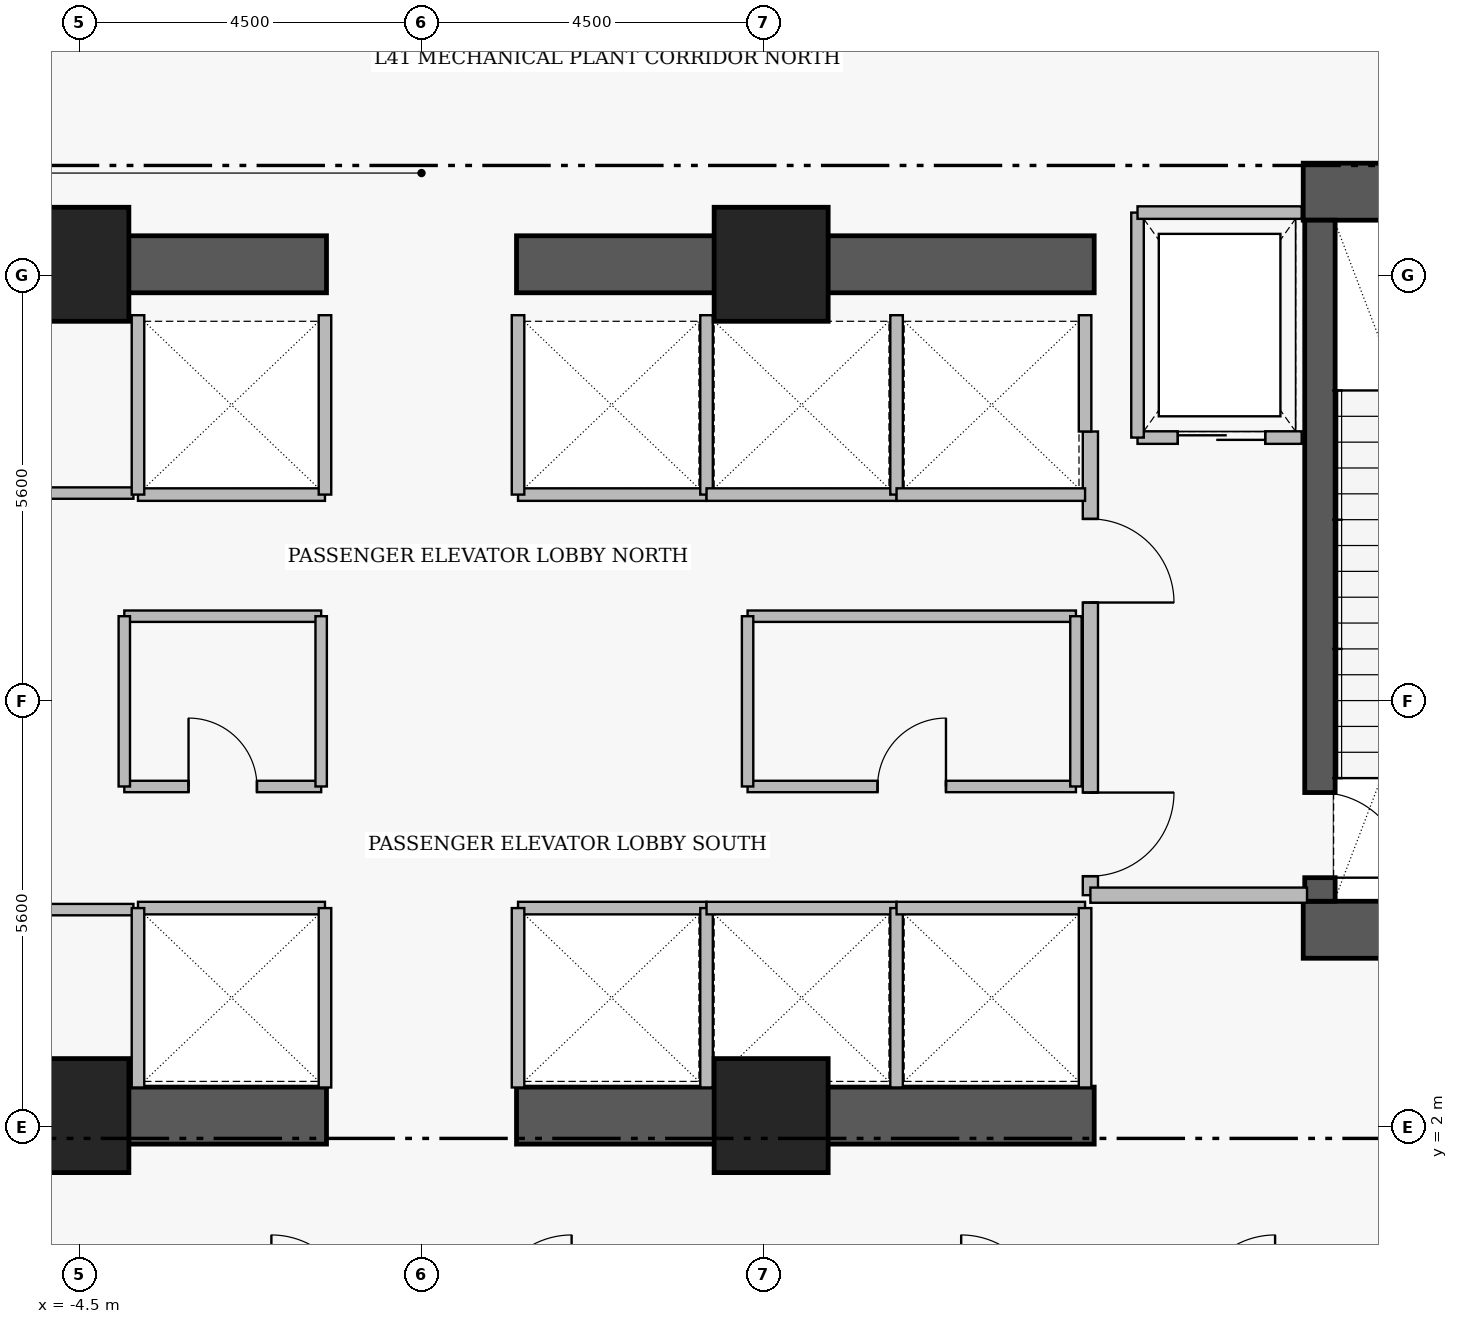
"""IFC4 building model, lengths in metres.
Left out: names, types, materials, properties, quantities, classifications, styles, units other than length and angle.
Written with IfcOpenShell. Run it as: python <this file> out.ifc"""

import sys

from ifc_helpers import new_model, si_unit, direction, frame, frame_2d, origin, origin_2d, place, context, subcontext, project, spatial, rectangle, extrude, element, fill, save


model = new_model("IFC4")
c1 = context("Model", 3, precision=1e-05, world=origin(), true_north=direction((0.0, 1.0)))
c2 = subcontext(c1, "Body", "Model", "MODEL_VIEW")
j1 = project(units=[si_unit("LENGTHUNIT", "METRE"), si_unit("PLANEANGLEUNIT", "RADIAN")], contexts=[c1])
p1 = place(None, origin())
s1 = spatial("IfcSite", under=j1, at=p1, CompositionType="ELEMENT")
p2 = place(p1, origin())
s2 = spatial("IfcBuilding", under=s1, at=p2, CompositionType="ELEMENT")
p3 = place(p2, frame((0.0, 0.0, 162.2)))
s3 = spatial("IfcBuildingStorey", under=s2, at=p3, CompositionType="ELEMENT", Elevation=162.2)
for number, where, z_axis, x_axis in (
    (1, (11.6, 14.305, 0.0), (0.0, 0.0, 1.0), (1.0, 0.0, 0.0)),
    (2, (11.6, 4.595, 0.0), (0.0, 0.0, 1.0), (1.0, 0.0, 0.0)),
):
    element("IfcWall", number, at=place(p3, frame(where, z_axis=z_axis, x_axis=x_axis)), inside=s3, PredefinedType="SHEAR", context=c2, shape_type="SweptSolid", body=[
        extrude(rectangle(XDim=4.56, YDim=0.75, at=frame_2d((2.28, 0.0))), origin(), (0.0, 0.0, 1.0), 5.81),
    ])
for number, where, z_axis, x_axis in (
    (3, (-8.85, 2.15, 0.0), (0.0, 0.0, 1.0), (1.0, 0.0, 0.0)),
    (4, (1.25, 2.15, 0.0), (0.0, 0.0, 1.0), (1.0, 0.0, 0.0)),
    (5, (-8.85, 13.35, 0.0), (0.0, 0.0, 1.0), (1.0, 0.0, 0.0)),
    (6, (1.25, 13.35, 0.0), (0.0, 0.0, 1.0), (1.0, 0.0, 0.0)),
):
    element("IfcWall", number, at=place(p3, frame(where, z_axis=z_axis, x_axis=x_axis)), inside=s3, PredefinedType="SHEAR", context=c2, shape_type="SweptSolid", body=[
        extrude(rectangle(XDim=7.6, YDim=0.75, at=frame_2d((3.8, 0.0))), origin(), (0.0, 0.0, 1.0), 5.74),
    ])
p4 = place(p3, frame((11.82, 13.93, 0.0), z_axis=(0.0, 0.0, 1.0), x_axis=(0.0, -1.0, 0.0)))
e7 = element("IfcWall", 7, at=p4, inside=s3, PredefinedType="SHEAR", context=c2, shape_type="SweptSolid", body=[
    extrude(rectangle(XDim=8.96, YDim=0.4, at=frame_2d((4.48, 0.0))), origin(), (0.0, 0.0, 1.0), 5.81),
])
p5 = place(p4, frame((7.53, 0.0, 0.0)))
e8 = element("IfcOpeningElement", 8, at=p5, cuts=e7, PredefinedType="OPENING", context=c2, shape_type="SweptSolid", body=[
    extrude(rectangle(XDim=1.12, YDim=2.22, at=frame_2d((0.56, 1.11))), frame((0.0, 0.21, 0.0), z_axis=(0.0, -1.0, 0.0), x_axis=(1.0, 0.0, 0.0)), (0.0, 0.0, 1.0), 0.42),
])
for number, where, z_axis, x_axis in (
    (9, (-4.6, 13.35, 0.0), (0.0, 0.0, 1.0), (1.0, 0.0, 0.0)),
    (10, (4.6, 13.35, 0.0), (0.0, 0.0, 1.0), (1.0, 0.0, 0.0)),
    (11, (-4.6, 2.15, 0.0), (0.0, 0.0, 1.0), (1.0, 0.0, 0.0)),
    (12, (4.6, 2.15, 0.0), (0.0, 0.0, 1.0), (1.0, 0.0, 0.0)),
):
    element("IfcColumn", number, at=place(p3, frame(where, z_axis=z_axis, x_axis=x_axis)), inside=s3, PredefinedType="COLUMN", context=c2, shape_type="SweptSolid", body=[
        extrude(rectangle(XDim=1.5, YDim=1.5, at=origin_2d()), origin(), (0.0, 0.0, 1.0), 6.0),
    ])
p6 = place(p3, frame((8.8, 11.15, 0.0), z_axis=(0.0, 0.0, 1.0), x_axis=(0.0, -1.0, 0.0)))
e13 = element("IfcWall", 13, at=p6, inside=s3, PredefinedType="PARTITIONING", context=c2, shape_type="SweptSolid", body=[
    extrude(rectangle(XDim=6.1, YDim=0.2, at=frame_2d((3.05, 0.0))), origin(), (0.0, 0.0, 1.0), 5.74),
])
p7 = place(p6, frame((1.15, 0.0, 0.0)))
e14 = element("IfcOpeningElement", 14, at=p7, cuts=e13, PredefinedType="OPENING", context=c2, shape_type="SweptSolid", body=[
    extrude(rectangle(XDim=1.1, YDim=2.2, at=frame_2d((0.55, 1.1))), frame((0.0, 0.11, 0.0), z_axis=(0.0, -1.0, 0.0), x_axis=(1.0, 0.0, 0.0)), (0.0, 0.0, 1.0), 0.22),
])
p8 = place(p6, frame((4.75, 0.0, 0.0)))
e15 = element("IfcOpeningElement", 15, at=p8, cuts=e13, PredefinedType="OPENING", context=c2, shape_type="SweptSolid", body=[
    extrude(rectangle(XDim=1.1, YDim=2.2, at=frame_2d((0.55, 1.1))), frame((0.0, 0.11, 0.0), z_axis=(0.0, -1.0, 0.0), x_axis=(1.0, 0.0, 0.0)), (0.0, 0.0, 1.0), 0.22),
])
p9 = place(p3, frame((9.42, 11.07, 0.0), z_axis=(0.0, 0.0, 1.0), x_axis=(1.0, 0.0, 0.0)))
e16 = element("IfcWall", 16, at=p9, inside=s3, PredefinedType="PARTITIONING", context=c2, shape_type="SweptSolid", body=[
    extrude(rectangle(XDim=2.16, YDim=0.165, at=frame_2d((1.08, 0.0))), origin(), (0.0, 0.0, 1.0), 5.74),
])
p10 = place(p9, frame((0.53, 0.0, 0.0)))
e17 = element("IfcOpeningElement", 17, at=p10, cuts=e16, PredefinedType="OPENING", context=c2, shape_type="SweptSolid", body=[
    extrude(rectangle(XDim=1.15, YDim=2.25, at=frame_2d((0.575, 1.125))), frame((0.0, 0.093, 0.0), z_axis=(0.0, -1.0, 0.0), x_axis=(1.0, 0.0, 0.0)), (0.0, 0.0, 1.0), 0.185),
])
p11 = place(p3, frame((-8.71, 4.86, 0.0), z_axis=(0.0, 0.0, 1.0), x_axis=(1.0, 0.0, 0.0)))
e18 = element("IfcWall", 18, at=p11, inside=s3, PredefinedType="PARTITIONING", context=c2, shape_type="SweptSolid", body=[
    extrude(rectangle(XDim=4.92, YDim=0.15, at=frame_2d((2.46, 0.0))), origin(), (0.0, 0.0, 1.0), 5.74),
])
p12 = place(p11, frame((2.01, 0.0, 0.0)))
e19 = element("IfcOpeningElement", 19, at=p12, cuts=e18, PredefinedType="OPENING", context=c2, shape_type="SweptSolid", body=[
    extrude(rectangle(XDim=0.9, YDim=2.15, at=frame_2d((0.45, 1.075))), frame((0.0, 0.085, 0.0), z_axis=(0.0, -1.0, 0.0), x_axis=(1.0, 0.0, 0.0)), (0.0, 0.0, 1.0), 0.17),
])
p13 = place(p3, frame((-8.31, 10.34, 0.0), z_axis=(0.0, 0.0, 1.0), x_axis=(1.0, 0.0, 0.0)))
e20 = element("IfcWall", 20, at=p13, inside=s3, PredefinedType="PARTITIONING", context=c2, shape_type="SweptSolid", body=[
    extrude(rectangle(XDim=4.52, YDim=0.15, at=frame_2d((2.26, 0.0))), origin(), (0.0, 0.0, 1.0), 5.74),
])
p14 = place(p13, frame((1.81, 0.0, 0.0)))
e21 = element("IfcOpeningElement", 21, at=p14, cuts=e20, PredefinedType="OPENING", context=c2, shape_type="SweptSolid", body=[
    extrude(rectangle(XDim=0.9, YDim=2.15, at=frame_2d((0.45, 1.075))), frame((0.0, 0.085, 0.0), z_axis=(0.0, -1.0, 0.0), x_axis=(1.0, 0.0, 0.0)), (0.0, 0.0, 1.0), 0.17),
])
p15 = place(p3, frame((-3.91, 6.48, 0.0), z_axis=(0.0, 0.0, 1.0), x_axis=(1.0, 0.0, 0.0)))
e22 = element("IfcWall", 22, at=p15, inside=s3, PredefinedType="PARTITIONING", context=c2, shape_type="SweptSolid", body=[
    extrude(rectangle(XDim=2.59, YDim=0.15, at=frame_2d((1.295, 0.0))), origin(), (0.0, 0.0, 1.0), 5.74),
])
p16 = place(p15, frame((0.845, 0.0, 0.0)))
e23 = element("IfcOpeningElement", 23, at=p16, cuts=e22, PredefinedType="OPENING", context=c2, shape_type="SweptSolid", body=[
    extrude(rectangle(XDim=0.9, YDim=2.15, at=frame_2d((0.45, 1.075))), frame((0.0, 0.085, 0.0), z_axis=(0.0, -1.0, 0.0), x_axis=(1.0, 0.0, 0.0)), (0.0, 0.0, 1.0), 0.17),
])
p17 = place(p3, frame((4.29, 6.48, 0.0), z_axis=(0.0, 0.0, 1.0), x_axis=(1.0, 0.0, 0.0)))
e24 = element("IfcWall", 24, at=p17, inside=s3, PredefinedType="PARTITIONING", context=c2, shape_type="SweptSolid", body=[
    extrude(rectangle(XDim=4.32, YDim=0.15, at=frame_2d((2.16, 0.0))), origin(), (0.0, 0.0, 1.0), 5.74),
])
p18 = place(p17, frame((1.71, 0.0, 0.0)))
e25 = element("IfcOpeningElement", 25, at=p18, cuts=e24, PredefinedType="OPENING", context=c2, shape_type="SweptSolid", body=[
    extrude(rectangle(XDim=0.9, YDim=2.15, at=frame_2d((0.45, 1.075))), frame((0.0, 0.085, 0.0), z_axis=(0.0, -1.0, 0.0), x_axis=(1.0, 0.0, 0.0)), (0.0, 0.0, 1.0), 0.17),
])
p19 = place(p3, frame((8.8, 5.05, 0.0), z_axis=(0.0, 0.0, 1.0), x_axis=(1.0, 0.0, 0.0)))
e26 = element("IfcWall", 26, at=p19, inside=s3, PredefinedType="PARTITIONING", context=c2, shape_type="SweptSolid", body=[
    extrude(rectangle(XDim=2.85, YDim=0.2, at=frame_2d((1.425, 0.0))), origin(), (0.0, 0.0, 1.0), 5.74),
])
p20 = place(p3, frame((9.42, 11.07, 0.0), z_axis=(0.0, 0.0, 1.0), x_axis=(0.0, 1.0, 0.0)))
e27 = element("IfcWall", 27, at=p20, inside=s3, PredefinedType="PARTITIONING", context=c2, shape_type="SweptSolid", body=[
    extrude(rectangle(XDim=2.96, YDim=0.165, at=frame_2d((1.48, 0.0))), origin(), (0.0, 0.0, 1.0), 5.74),
])
p21 = place(p3, frame((9.42, 14.03, 0.0), z_axis=(0.0, 0.0, 1.0), x_axis=(1.0, 0.0, 0.0)))
e28 = element("IfcWall", 28, at=p21, inside=s3, PredefinedType="PARTITIONING", context=c2, shape_type="SweptSolid", body=[
    extrude(rectangle(XDim=2.16, YDim=0.165, at=frame_2d((1.08, 0.0))), origin(), (0.0, 0.0, 1.0), 5.74),
])
p22 = place(p3, frame((-3.73, 4.88, 0.0), z_axis=(0.0, 0.0, 1.0), x_axis=(1.0, 0.0, 0.0)))
e29 = element("IfcWall", 29, at=p22, inside=s3, PredefinedType="PARTITIONING", context=c2, shape_type="SweptSolid", body=[
    extrude(rectangle(XDim=2.46, YDim=0.165, at=frame_2d((1.23, 0.0))), origin(), (0.0, 0.0, 1.0), 5.74),
])
for number, where, z_axis, x_axis in (
    (30, (-3.73, 2.52, 0.0), (0.0, 0.0, 1.0), (0.0, 1.0, 0.0)),
    (31, (-1.27, 2.52, 0.0), (0.0, 0.0, 1.0), (0.0, 1.0, 0.0)),
):
    element("IfcWall", number, at=place(p3, frame(where, z_axis=z_axis, x_axis=x_axis)), inside=s3, PredefinedType="PARTITIONING", context=c2, shape_type="SweptSolid", body=[
        extrude(rectangle(XDim=2.36, YDim=0.165, at=frame_2d((1.18, 0.0))), origin(), (0.0, 0.0, 1.0), 5.74),
    ])
p23 = place(p3, frame((1.27, 4.88, 0.0), z_axis=(0.0, 0.0, 1.0), x_axis=(1.0, 0.0, 0.0)))
e32 = element("IfcWall", 32, at=p23, inside=s3, PredefinedType="PARTITIONING", context=c2, shape_type="SweptSolid", body=[
    extrude(rectangle(XDim=2.48, YDim=0.165, at=frame_2d((1.24, 0.0))), origin(), (0.0, 0.0, 1.0), 5.74),
])
for number, where, z_axis, x_axis in (
    (33, (1.27, 2.52, 0.0), (0.0, 0.0, 1.0), (0.0, 1.0, 0.0)),
    (34, (3.75, 2.52, 0.0), (0.0, 0.0, 1.0), (0.0, 1.0, 0.0)),
):
    element("IfcWall", number, at=place(p3, frame(where, z_axis=z_axis, x_axis=x_axis)), inside=s3, PredefinedType="PARTITIONING", context=c2, shape_type="SweptSolid", body=[
        extrude(rectangle(XDim=2.36, YDim=0.165, at=frame_2d((1.18, 0.0))), origin(), (0.0, 0.0, 1.0), 5.74),
    ])
p24 = place(p3, frame((-3.73, 10.32, 0.0), z_axis=(0.0, 0.0, 1.0), x_axis=(1.0, 0.0, 0.0)))
e35 = element("IfcWall", 35, at=p24, inside=s3, PredefinedType="PARTITIONING", context=c2, shape_type="SweptSolid", body=[
    extrude(rectangle(XDim=2.46, YDim=0.165, at=frame_2d((1.23, 0.0))), origin(), (0.0, 0.0, 1.0), 5.74),
])
for number, where, z_axis, x_axis in (
    (36, (-3.73, 10.32, 0.0), (0.0, 0.0, 1.0), (0.0, 1.0, 0.0)),
    (37, (-1.27, 10.32, 0.0), (0.0, 0.0, 1.0), (0.0, 1.0, 0.0)),
):
    element("IfcWall", number, at=place(p3, frame(where, z_axis=z_axis, x_axis=x_axis)), inside=s3, PredefinedType="PARTITIONING", context=c2, shape_type="SweptSolid", body=[
        extrude(rectangle(XDim=2.36, YDim=0.165, at=frame_2d((1.18, 0.0))), origin(), (0.0, 0.0, 1.0), 5.74),
    ])
p25 = place(p3, frame((1.27, 10.32, 0.0), z_axis=(0.0, 0.0, 1.0), x_axis=(1.0, 0.0, 0.0)))
e38 = element("IfcWall", 38, at=p25, inside=s3, PredefinedType="PARTITIONING", context=c2, shape_type="SweptSolid", body=[
    extrude(rectangle(XDim=2.48, YDim=0.165, at=frame_2d((1.24, 0.0))), origin(), (0.0, 0.0, 1.0), 5.74),
])
for number, where, z_axis, x_axis in (
    (39, (1.27, 10.32, 0.0), (0.0, 0.0, 1.0), (0.0, 1.0, 0.0)),
    (40, (3.75, 10.32, 0.0), (0.0, 0.0, 1.0), (0.0, 1.0, 0.0)),
):
    element("IfcWall", number, at=place(p3, frame(where, z_axis=z_axis, x_axis=x_axis)), inside=s3, PredefinedType="PARTITIONING", context=c2, shape_type="SweptSolid", body=[
        extrude(rectangle(XDim=2.36, YDim=0.165, at=frame_2d((1.18, 0.0))), origin(), (0.0, 0.0, 1.0), 5.74),
    ])
p26 = place(p3, frame((3.75, 4.88, 0.0), z_axis=(0.0, 0.0, 1.0), x_axis=(1.0, 0.0, 0.0)))
e41 = element("IfcWall", 41, at=p26, inside=s3, PredefinedType="PARTITIONING", context=c2, shape_type="SweptSolid", body=[
    extrude(rectangle(XDim=2.5, YDim=0.165, at=frame_2d((1.25, 0.0))), origin(), (0.0, 0.0, 1.0), 5.74),
])
p27 = place(p3, frame((6.25, 2.52, 0.0), z_axis=(0.0, 0.0, 1.0), x_axis=(0.0, 1.0, 0.0)))
e42 = element("IfcWall", 42, at=p27, inside=s3, PredefinedType="PARTITIONING", context=c2, shape_type="SweptSolid", body=[
    extrude(rectangle(XDim=2.36, YDim=0.165, at=frame_2d((1.18, 0.0))), origin(), (0.0, 0.0, 1.0), 5.74),
])
p28 = place(p3, frame((6.25, 4.88, 0.0), z_axis=(0.0, 0.0, 1.0), x_axis=(1.0, 0.0, 0.0)))
e43 = element("IfcWall", 43, at=p28, inside=s3, PredefinedType="PARTITIONING", context=c2, shape_type="SweptSolid", body=[
    extrude(rectangle(XDim=2.48, YDim=0.165, at=frame_2d((1.24, 0.0))), origin(), (0.0, 0.0, 1.0), 5.74),
])
p29 = place(p3, frame((8.73, 2.52, 0.0), z_axis=(0.0, 0.0, 1.0), x_axis=(0.0, 1.0, 0.0)))
e44 = element("IfcWall", 44, at=p29, inside=s3, PredefinedType="PARTITIONING", context=c2, shape_type="SweptSolid", body=[
    extrude(rectangle(XDim=2.36, YDim=0.165, at=frame_2d((1.18, 0.0))), origin(), (0.0, 0.0, 1.0), 5.74),
])
p30 = place(p3, frame((3.75, 10.32, 0.0), z_axis=(0.0, 0.0, 1.0), x_axis=(1.0, 0.0, 0.0)))
e45 = element("IfcWall", 45, at=p30, inside=s3, PredefinedType="PARTITIONING", context=c2, shape_type="SweptSolid", body=[
    extrude(rectangle(XDim=2.5, YDim=0.165, at=frame_2d((1.25, 0.0))), origin(), (0.0, 0.0, 1.0), 5.74),
])
p31 = place(p3, frame((6.25, 10.32, 0.0), z_axis=(0.0, 0.0, 1.0), x_axis=(0.0, 1.0, 0.0)))
e46 = element("IfcWall", 46, at=p31, inside=s3, PredefinedType="PARTITIONING", context=c2, shape_type="SweptSolid", body=[
    extrude(rectangle(XDim=2.36, YDim=0.165, at=frame_2d((1.18, 0.0))), origin(), (0.0, 0.0, 1.0), 5.74),
])
p32 = place(p3, frame((6.25, 10.32, 0.0), z_axis=(0.0, 0.0, 1.0), x_axis=(1.0, 0.0, 0.0)))
e47 = element("IfcWall", 47, at=p32, inside=s3, PredefinedType="PARTITIONING", context=c2, shape_type="SweptSolid", body=[
    extrude(rectangle(XDim=2.48, YDim=0.165, at=frame_2d((1.24, 0.0))), origin(), (0.0, 0.0, 1.0), 5.74),
])
p33 = place(p3, frame((8.73, 11.15, 0.0), z_axis=(0.0, 0.0, 1.0), x_axis=(0.0, 1.0, 0.0)))
e48 = element("IfcWall", 48, at=p33, inside=s3, PredefinedType="PARTITIONING", context=c2, shape_type="SweptSolid", body=[
    extrude(rectangle(XDim=1.53, YDim=0.165, at=frame_2d((0.765, 0.0))), origin(), (0.0, 0.0, 1.0), 5.74),
])
p34 = place(p3, frame((-3.91, 8.72, 0.0), z_axis=(0.0, 0.0, 1.0), x_axis=(1.0, 0.0, 0.0)))
e49 = element("IfcWall", 49, at=p34, inside=s3, PredefinedType="PARTITIONING", context=c2, shape_type="SweptSolid", body=[
    extrude(rectangle(XDim=2.59, YDim=0.15, at=frame_2d((1.295, 0.0))), origin(), (0.0, 0.0, 1.0), 5.74),
])
for number, where, z_axis, x_axis in (
    (50, (-3.91, 6.48, 0.0), (0.0, 0.0, 1.0), (0.0, 1.0, 0.0)),
    (51, (-1.32, 6.48, 0.0), (0.0, 0.0, 1.0), (0.0, 1.0, 0.0)),
):
    element("IfcWall", number, at=place(p3, frame(where, z_axis=z_axis, x_axis=x_axis)), inside=s3, PredefinedType="PARTITIONING", context=c2, shape_type="SweptSolid", body=[
        extrude(rectangle(XDim=2.24, YDim=0.15, at=frame_2d((1.12, 0.0))), origin(), (0.0, 0.0, 1.0), 5.74),
    ])
p35 = place(p3, frame((4.29, 8.72, 0.0), z_axis=(0.0, 0.0, 1.0), x_axis=(1.0, 0.0, 0.0)))
e52 = element("IfcWall", 52, at=p35, inside=s3, PredefinedType="PARTITIONING", context=c2, shape_type="SweptSolid", body=[
    extrude(rectangle(XDim=4.32, YDim=0.15, at=frame_2d((2.16, 0.0))), origin(), (0.0, 0.0, 1.0), 5.74),
])
for number, where, z_axis, x_axis in (
    (53, (4.29, 6.48, 0.0), (0.0, 0.0, 1.0), (0.0, 1.0, 0.0)),
    (54, (8.61, 6.48, 0.0), (0.0, 0.0, 1.0), (0.0, 1.0, 0.0)),
):
    element("IfcWall", number, at=place(p3, frame(where, z_axis=z_axis, x_axis=x_axis)), inside=s3, PredefinedType="PARTITIONING", context=c2, shape_type="SweptSolid", body=[
        extrude(rectangle(XDim=2.24, YDim=0.15, at=frame_2d((1.12, 0.0))), origin(), (0.0, 0.0, 1.0), 5.74),
    ])
p36 = place(p5, origin())
e55 = element("IfcDoor", 55, at=p36, inside=s3, OperationType="SINGLE_SWING_RIGHT", PredefinedType="DOOR", context=c2, shape_type="SweptSolid", body=[
    extrude(rectangle(XDim=1.12, YDim=2.22, at=frame_2d((0.56, 1.11))), frame((0.0, 0.025, 0.0), z_axis=(0.0, -1.0, 0.0), x_axis=(1.0, 0.0, 0.0)), (0.0, 0.0, 1.0), 0.05),
])
fill(e8, e55)
p37 = place(p7, origin())
e56 = element("IfcDoor", 56, at=p37, inside=s3, OperationType="SINGLE_SWING_RIGHT", PredefinedType="DOOR", context=c2, shape_type="SweptSolid", body=[
    extrude(rectangle(XDim=1.1, YDim=2.2, at=frame_2d((0.55, 1.1))), frame((0.0, 0.025, 0.0), z_axis=(0.0, -1.0, 0.0), x_axis=(1.0, 0.0, 0.0)), (0.0, 0.0, 1.0), 0.05),
])
fill(e14, e56)
p38 = place(p8, origin())
e57 = element("IfcDoor", 57, at=p38, inside=s3, OperationType="SINGLE_SWING_LEFT", PredefinedType="DOOR", context=c2, shape_type="SweptSolid", body=[
    extrude(rectangle(XDim=1.1, YDim=2.2, at=frame_2d((0.55, 1.1))), frame((0.0, 0.025, 0.0), z_axis=(0.0, -1.0, 0.0), x_axis=(1.0, 0.0, 0.0)), (0.0, 0.0, 1.0), 0.05),
])
fill(e15, e57)
p39 = place(p10, origin())
e58 = element("IfcDoor", 58, at=p39, inside=s3, OperationType="SLIDING_TO_LEFT", PredefinedType="DOOR", context=c2, shape_type="SweptSolid", body=[
    extrude(rectangle(XDim=1.15, YDim=2.25, at=frame_2d((0.575, 1.125))), frame((0.0, 0.025, 0.0), z_axis=(0.0, -1.0, 0.0), x_axis=(1.0, 0.0, 0.0)), (0.0, 0.0, 1.0), 0.05),
])
fill(e17, e58)
p40 = place(p16, origin())
e59 = element("IfcDoor", 59, at=p40, inside=s3, OperationType="SINGLE_SWING_LEFT", PredefinedType="DOOR", context=c2, shape_type="SweptSolid", body=[
    extrude(rectangle(XDim=0.9, YDim=2.15, at=frame_2d((0.45, 1.075))), frame((0.0, 0.025, 0.0), z_axis=(0.0, -1.0, 0.0), x_axis=(1.0, 0.0, 0.0)), (0.0, 0.0, 1.0), 0.05),
])
fill(e23, e59)
p41 = place(p18, origin())
e60 = element("IfcDoor", 60, at=p41, inside=s3, OperationType="SINGLE_SWING_RIGHT", PredefinedType="DOOR", context=c2, shape_type="SweptSolid", body=[
    extrude(rectangle(XDim=0.9, YDim=2.15, at=frame_2d((0.45, 1.075))), frame((0.0, 0.025, 0.0), z_axis=(0.0, -1.0, 0.0), x_axis=(1.0, 0.0, 0.0)), (0.0, 0.0, 1.0), 0.05),
])
fill(e25, e60)
save(model, sys.argv[1])
